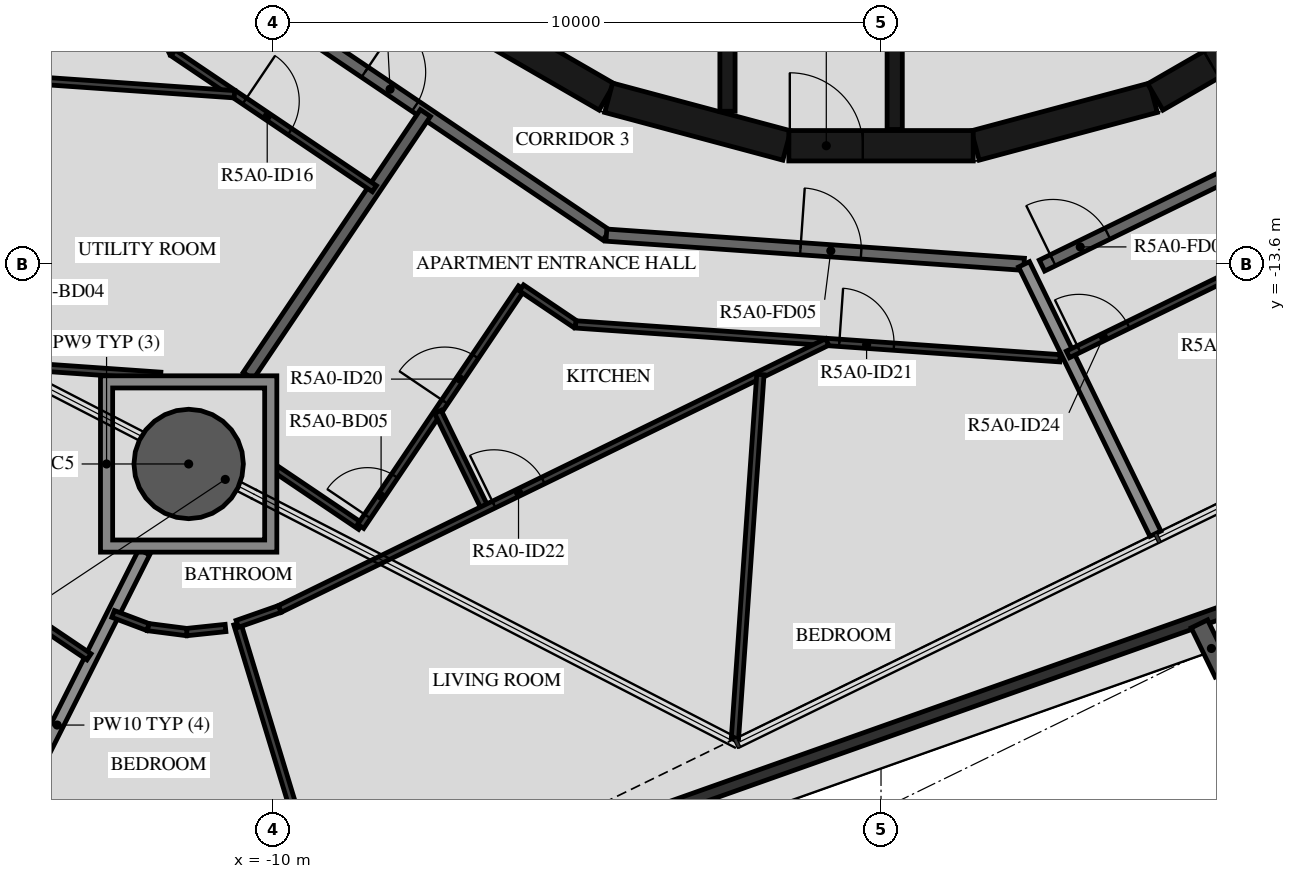
"""IFC4 building model, lengths in metres.
Left out: names, types, materials, properties, quantities, classifications, styles, units other than length and angle.
Written with IfcOpenShell. Run it as: python <this file> out.ifc"""

import sys

from ifc_helpers import new_model, si_unit, direction, frame, frame_2d, origin, origin_2d, place, context, subcontext, project, spatial, polyline, rectangle, hollow_circle, i_section, outline, extrude, element, fill, save


model = new_model("IFC4")
c1 = context("Model", 3, precision=1e-05, world=origin(), true_north=direction((0.0, 1.0)))
c2 = subcontext(c1, "Body", "Model", "MODEL_VIEW")
j1 = project(units=[si_unit("LENGTHUNIT", "METRE"), si_unit("PLANEANGLEUNIT", "RADIAN")], contexts=[c1])
p1 = place(None, origin())
s1 = spatial("IfcSite", under=j1, at=p1, CompositionType="ELEMENT")
p2 = place(p1, origin())
s2 = spatial("IfcBuilding", under=s1, at=p2, CompositionType="ELEMENT")
p3 = place(p2, frame((0.0, 0.0, 188.4)))
s3 = spatial("IfcBuildingStorey", under=s2, at=p3, CompositionType="ELEMENT", Elevation=188.4)
p4 = place(p3, frame((-11.386, -16.881, -0.45), z_axis=(0.0, 0.0, 1.0), x_axis=(1.0, 0.0, 0.0)))
e1 = element("IfcColumn", 1, at=p4, inside=s3, PredefinedType="COLUMN", context=c2, shape_type="SweptSolid", body=[
    extrude(hollow_circle(Radius=0.9, WallThickness=0.04, at=origin_2d()), origin(), (0.0, 0.0, 1.0), 3.57),
])
p5 = place(p3, frame((5.433, -19.915, -0.45), z_axis=(0.0, 0.0, 1.0), x_axis=(-0.898794095235, -0.438371046456, 0.0)))
e2 = element("IfcColumn", 2, at=p5, inside=s3, PredefinedType="COLUMN", context=c2, shape_type="SweptSolid", body=[
    extrude(i_section(OverallWidth=0.3, OverallDepth=0.9, WebThickness=0.019, FlangeThickness=0.035, FilletRadius=0.03, at=origin_2d()), origin(), (0.0, 0.0, 1.0), 3.57),
])
p6 = place(p3, frame((6.704, -18.931, 0.03), z_axis=(0.0, 0.0, 1.0), x_axis=(-0.942641899569, -0.33380570573, 0.0)))
e3 = element("IfcWall", 3, at=p6, inside=s3, PredefinedType="PARAPET", context=c2, shape_type="SweptSolid", body=[
    extrude(rectangle(XDim=18.214, YDim=0.2, at=frame_2d((9.107, 0.0))), origin(), (0.0, 0.0, 1.0), 1.5),
])
p7 = place(p3, frame((1.55, -11.643, 0.0), z_axis=(0.0, 0.0, 1.0), x_axis=(0.965948410781, 0.258734743916, 0.0)))
e4 = element("IfcWall", 4, at=p7, inside=s3, PredefinedType="SHEAR", context=c2, shape_type="SweptSolid", body=[
    extrude(rectangle(XDim=3.033, YDim=0.5, at=frame_2d((1.516, 0.0))), origin(), (0.0, 0.0, 1.0), 3.12),
])
p8 = place(p3, frame((4.51, -10.845, 0.0), z_axis=(0.0, 0.0, 1.0), x_axis=(0.865975092491, 0.500087131594, 0.0)))
e5 = element("IfcWall", 5, at=p8, inside=s3, PredefinedType="SHEAR", context=c2, shape_type="SweptSolid", body=[
    extrude(rectangle(XDim=3.033, YDim=0.5, at=frame_2d((1.516, 0.0))), origin(), (0.0, 0.0, 1.0), 3.12),
])
p9 = place(p8, frame((1.066, 0.0, 0.0)))
e6 = element("IfcOpeningElement", 6, at=p9, cuts=e5, PredefinedType="OPENING", context=c2, shape_type="SweptSolid", body=[
    extrude(rectangle(XDim=0.9, YDim=2.1, at=frame_2d((0.45, 1.05))), frame((0.0, 0.26, 0.0), z_axis=(0.0, -1.0, 0.0), x_axis=(1.0, 0.0, 0.0)), (0.0, 0.0, 1.0), 0.52),
])
for number, where, z_axis, x_axis in (
    (7, (-7.137, -9.329, 0.0), (0.0, 0.0, 1.0), (0.866, -0.5, 0.0)),
    (8, (-4.479, -10.858, 0.0), (0.0, 0.0, 1.0), (0.966, -0.259, 0.0)),
):
    element("IfcWall", number, at=place(p3, frame(where, z_axis=z_axis, x_axis=x_axis)), inside=s3, PredefinedType="SHEAR", context=c2, shape_type="SweptSolid", body=[
        extrude(rectangle(XDim=3.033, YDim=0.5, at=frame_2d((1.516, 0.0))), origin(), (0.0, 0.0, 1.0), 3.12),
    ])
p10 = place(p3, frame((-1.516, -11.647, 0.0), z_axis=(0.0, 0.0, 1.0), x_axis=(1.0, 0.0, 0.0)))
e9 = element("IfcWall", 9, at=p10, inside=s3, PredefinedType="SHEAR", context=c2, shape_type="SweptSolid", body=[
    extrude(rectangle(XDim=3.033, YDim=0.5, at=frame_2d((1.516, 0.0))), origin(), (0.0, 0.0, 1.0), 3.12),
])
p11 = place(p10, frame((0.016, 0.0, 0.0)))
e10 = element("IfcOpeningElement", 10, at=p11, cuts=e9, PredefinedType="OPENING", context=c2, shape_type="SweptSolid", body=[
    extrude(rectangle(XDim=1.2, YDim=2.1, at=frame_2d((0.6, 1.05))), frame((0.0, 0.26, 0.0), z_axis=(0.0, -1.0, 0.0), x_axis=(1.0, 0.0, 0.0)), (0.0, 0.0, 1.0), 0.52),
])
p12 = place(p3, frame((-2.525, -8.97, 0.0), z_axis=(0.0, 0.0, 1.0), x_axis=(0.0, -1.0, 0.0)))
e11 = element("IfcWall", 11, at=p12, inside=s3, PredefinedType="SHEAR", context=c2, shape_type="SweptSolid", body=[
    extrude(rectangle(XDim=2.11, YDim=0.25, at=frame_2d((1.055, 0.0))), origin(), (0.0, 0.0, 1.0), 3.12),
])
p13 = place(p3, frame((0.225, -8.97, 0.0), z_axis=(0.0, 0.0, 1.0), x_axis=(0.0, -1.0, 0.0)))
e12 = element("IfcWall", 12, at=p13, inside=s3, PredefinedType="SHEAR", context=c2, shape_type="SweptSolid", body=[
    extrude(rectangle(XDim=2.41, YDim=0.25, at=frame_2d((1.205, 0.0))), origin(), (0.0, 0.0, 1.0), 3.12),
])
p14 = place(p3, frame((-10.47, -9.101, 0.0), z_axis=(0.0, 0.0, 1.0), x_axis=(0.829035841718, -0.559195469534, 0.0)))
e13 = element("IfcWall", 13, at=p14, inside=s3, PredefinedType="STANDARD", context=c2, shape_type="SweptSolid", body=[
    extrude(rectangle(XDim=7.181, YDim=0.2, at=frame_2d((3.591, 0.0))), origin(), (0.0, 0.0, 1.0), 3.12),
])
p15 = place(p14, frame((2.39, 0.0, 0.0)))
e14 = element("IfcOpeningElement", 14, at=p15, cuts=e13, PredefinedType="OPENING", context=c2, shape_type="SweptSolid", body=[
    extrude(rectangle(XDim=1.0, YDim=2.1, at=frame_2d((0.5, 1.05))), frame((0.0, 0.11, 0.0), z_axis=(0.0, -1.0, 0.0), x_axis=(1.0, 0.0, 0.0)), (0.0, 0.0, 1.0), 0.22),
])
p16 = place(p3, frame((-4.517, -13.117, 0.0), z_axis=(0.0, 0.0, 1.0), x_axis=(0.997564669554, -0.069747616856, 0.0)))
e15 = element("IfcWall", 15, at=p16, inside=s3, PredefinedType="STANDARD", context=c2, shape_type="SweptSolid", body=[
    extrude(rectangle(XDim=6.885, YDim=0.2, at=frame_2d((3.443, 0.0))), origin(), (0.0, 0.0, 1.0), 3.12),
])
p17 = place(p16, frame((3.2, 0.0, 0.0)))
e16 = element("IfcOpeningElement", 16, at=p17, cuts=e15, PredefinedType="OPENING", context=c2, shape_type="SweptSolid", body=[
    extrude(rectangle(XDim=1.0, YDim=2.1, at=frame_2d((0.5, 1.05))), frame((0.0, 0.11, 0.0), z_axis=(0.0, -1.0, 0.0), x_axis=(1.0, 0.0, 0.0)), (0.0, 0.0, 1.0), 0.22),
])
p18 = place(p3, frame((2.647, -13.618, 0.0), z_axis=(0.0, 0.0, 1.0), x_axis=(0.898796543751, 0.438366026218, 0.0)))
e17 = element("IfcWall", 17, at=p18, inside=s3, PredefinedType="STANDARD", context=c2, shape_type="SweptSolid", body=[
    extrude(rectangle(XDim=7.181, YDim=0.2, at=frame_2d((3.591, 0.0))), origin(), (0.0, 0.0, 1.0), 3.12),
])
p19 = place(p18, frame((0.2, 0.0, 0.0)))
e18 = element("IfcOpeningElement", 18, at=p19, cuts=e17, PredefinedType="OPENING", context=c2, shape_type="SweptSolid", body=[
    extrude(rectangle(XDim=1.0, YDim=2.1, at=frame_2d((0.5, 1.05))), frame((0.0, 0.11, 0.0), z_axis=(0.0, -1.0, 0.0), x_axis=(1.0, 0.0, 0.0)), (0.0, 0.0, 1.0), 0.22),
])
p20 = place(p3, frame((-10.407, -15.43, 0.0), z_axis=(0.0, 0.0, 1.0), x_axis=(0.559038328133, 0.829141813973, 0.0)))
e19 = element("IfcWall", 19, at=p20, inside=s3, PredefinedType="STANDARD", context=c2, shape_type="SweptSolid", body=[
    extrude(rectangle(XDim=5.212, YDim=0.2, at=frame_2d((2.606, 0.0))), origin(), (0.0, 0.0, 1.0), 3.12),
])
p21 = place(p3, frame((-14.979, -24.017, 0.0), z_axis=(0.0, 0.0, 1.0), x_axis=(0.449711952388, 0.893173644864, 0.0)))
e20 = element("IfcWall", 20, at=p21, inside=s3, PredefinedType="STANDARD", context=c2, shape_type="SweptSolid", body=[
    extrude(rectangle(XDim=6.367, YDim=0.2, at=frame_2d((3.184, 0.0))), origin(), (0.0, 0.0, 1.0), 2.73),
])
p22 = place(p3, frame((4.512, -18.027, 0.0), z_axis=(0.0, 0.0, 1.0), x_axis=(-0.438374835386, 0.898792247241, 0.0)))
e21 = element("IfcWall", 21, at=p22, inside=s3, PredefinedType="STANDARD", context=c2, shape_type="SweptSolid", body=[
    extrude(rectangle(XDim=4.929, YDim=0.2, at=frame_2d((2.464, 0.0))), origin(), (0.0, 0.0, 1.0), 2.73),
])
p23 = place(p3, frame((-13.715, -5.87, 0.0), z_axis=(0.0, 0.0, 1.0), x_axis=(0.438372766482, -0.89879325632, 0.0)))
e22 = element("IfcWall", 22, at=p23, inside=s3, PredefinedType="PARTITIONING", context=c2, shape_type="SweptSolid", body=[
    extrude(rectangle(XDim=4.728, YDim=0.12, at=frame_2d((2.364, 0.0))), origin(), (0.0, 0.0, 1.0), 3.12),
])
p24 = place(p23, frame((0.4, 0.0, 0.0)))
e23 = element("IfcOpeningElement", 23, at=p24, cuts=e22, PredefinedType="OPENING", context=c2, shape_type="SweptSolid", body=[
    extrude(rectangle(XDim=0.9, YDim=2.1, at=frame_2d((0.45, 1.05))), frame((0.0, 0.07, 0.0), z_axis=(0.0, -1.0, 0.0), x_axis=(1.0, 0.0, 0.0)), (0.0, 0.0, 1.0), 0.14),
])
p25 = place(p3, frame((-11.642, -10.12, 0.0), z_axis=(0.0, 0.0, 1.0), x_axis=(0.829018066952, -0.559221820629, 0.0)))
e24 = element("IfcWall", 24, at=p25, inside=s3, PredefinedType="PARTITIONING", context=c2, shape_type="SweptSolid", body=[
    extrude(rectangle(XDim=3.992, YDim=0.12, at=frame_2d((1.996, 0.0))), origin(), (0.0, 0.0, 1.0), 3.12),
])
p26 = place(p25, frame((1.417, 0.0, 0.0)))
e25 = element("IfcOpeningElement", 25, at=p26, cuts=e24, PredefinedType="OPENING", context=c2, shape_type="SweptSolid", body=[
    extrude(rectangle(XDim=0.9, YDim=2.1, at=frame_2d((0.45, 1.05))), frame((0.0, 0.07, 0.0), z_axis=(0.0, -1.0, 0.0), x_axis=(1.0, 0.0, 0.0)), (0.0, 0.0, 1.0), 0.14),
])
p27 = place(p3, frame((-14.551, -10.527, 0.0), z_axis=(0.0, 0.0, 1.0), x_axis=(0.997564247633, -0.069753651118, 0.0)))
e26 = element("IfcWall", 26, at=p27, inside=s3, PredefinedType="PARTITIONING", context=c2, shape_type="SweptSolid", body=[
    extrude(rectangle(XDim=3.927, YDim=0.12, at=frame_2d((1.963, 0.0))), origin(), (0.0, 0.0, 1.0), 3.12),
])
p28 = place(p3, frame((-14.879, -15.219, 0.0), z_axis=(0.0, 0.0, 1.0), x_axis=(0.997566012813, -0.069728402248, 0.0)))
e27 = element("IfcWall", 27, at=p28, inside=s3, PredefinedType="PARTITIONING", context=c2, shape_type="SweptSolid", body=[
    extrude(rectangle(XDim=3.039, YDim=0.12, at=frame_2d((1.52, 0.0))), origin(), (0.0, 0.0, 1.0), 3.12),
])
p29 = place(p28, frame((0.2, 0.0, 0.0)))
e28 = element("IfcOpeningElement", 28, at=p29, cuts=e27, PredefinedType="OPENING", context=c2, shape_type="SweptSolid", body=[
    extrude(rectangle(XDim=0.8, YDim=2.1, at=frame_2d((0.4, 1.05))), frame((0.0, 0.07, 0.0), z_axis=(0.0, -1.0, 0.0), x_axis=(1.0, 0.0, 0.0)), (0.0, 0.0, 1.0), 0.14),
])
p30 = place(p3, frame((-13.025, -20.052, 0.0), z_axis=(0.0, 0.0, 1.0), x_axis=(-0.828910137223, 0.559381787699, 0.0)))
e29 = element("IfcWall", 29, at=p30, inside=s3, PredefinedType="PARTITIONING", context=c2, shape_type="SweptSolid", body=[
    extrude(rectangle(XDim=0.829, YDim=0.12, at=frame_2d((0.415, 0.0))), origin(), (0.0, 0.0, 1.0), 3.12),
])
p31 = place(p3, frame((-9.936, -16.976, 0.0), z_axis=(0.0, 0.0, 1.0), x_axis=(0.829057888835, -0.559162782167, 0.0)))
e30 = element("IfcWall", 30, at=p31, inside=s3, PredefinedType="PARTITIONING", context=c2, shape_type="SweptSolid", body=[
    extrude(rectangle(XDim=1.664, YDim=0.12, at=frame_2d((0.832, 0.0))), origin(), (0.0, 0.0, 1.0), 3.12),
])
p32 = place(p3, frame((-8.557, -17.906, 0.0), z_axis=(0.0, 0.0, 1.0), x_axis=(0.559194471553, 0.829036514868, 0.0)))
e31 = element("IfcWall", 31, at=p32, inside=s3, PredefinedType="PARTITIONING", context=c2, shape_type="SweptSolid", body=[
    extrude(rectangle(XDim=4.73, YDim=0.12, at=frame_2d((2.365, 0.0))), origin(), (0.0, 0.0, 1.0), 3.12),
])
p33 = place(p32, frame((0.2, 0.0, 0.0)))
e32 = element("IfcOpeningElement", 32, at=p33, cuts=e31, PredefinedType="OPENING", context=c2, shape_type="SweptSolid", body=[
    extrude(rectangle(XDim=0.8, YDim=2.1, at=frame_2d((0.4, 1.05))), frame((0.0, 0.07, 0.0), z_axis=(0.0, -1.0, 0.0), x_axis=(1.0, 0.0, 0.0)), (0.0, 0.0, 1.0), 0.14),
])
p34 = place(p32, frame((2.471, 0.0, 0.0)))
e33 = element("IfcOpeningElement", 33, at=p34, cuts=e31, PredefinedType="OPENING", context=c2, shape_type="SweptSolid", body=[
    extrude(rectangle(XDim=0.9, YDim=2.1, at=frame_2d((0.45, 1.05))), frame((0.0, 0.07, 0.0), z_axis=(0.0, -1.0, 0.0), x_axis=(1.0, 0.0, 0.0)), (0.0, 0.0, 1.0), 0.14),
])
p35 = place(p3, frame((-5.912, -13.985, 0.0), z_axis=(0.0, 0.0, 1.0), x_axis=(0.829027978444, -0.559207127062, 0.0)))
e34 = element("IfcWall", 34, at=p35, inside=s3, PredefinedType="PARTITIONING", context=c2, shape_type="SweptSolid", body=[
    extrude(rectangle(XDim=1.073, YDim=0.12, at=frame_2d((0.537, 0.0))), origin(), (0.0, 0.0, 1.0), 3.12),
])
p36 = place(p3, frame((-5.022, -14.585, 0.0), z_axis=(0.0, 0.0, 1.0), x_axis=(0.997565118395, -0.069741197017, 0.0)))
e35 = element("IfcWall", 35, at=p36, inside=s3, PredefinedType="PARTITIONING", context=c2, shape_type="SweptSolid", body=[
    extrude(rectangle(XDim=7.985, YDim=0.12, at=frame_2d((3.993, 0.0))), origin(), (0.0, 0.0, 1.0), 3.12),
])
p37 = place(p36, frame((4.346, 0.0, 0.0)))
e36 = element("IfcOpeningElement", 36, at=p37, cuts=e35, PredefinedType="OPENING", context=c2, shape_type="SweptSolid", body=[
    extrude(rectangle(XDim=0.9, YDim=2.1, at=frame_2d((0.45, 1.05))), frame((0.0, 0.07, 0.0), z_axis=(0.0, -1.0, 0.0), x_axis=(1.0, 0.0, 0.0)), (0.0, 0.0, 1.0), 0.14),
])
p38 = place(p3, frame((-10.78, -19.578, 0.0), z_axis=(0.0, 0.0, 1.0), x_axis=(-0.994515867502, -0.104585798686, 0.0)))
e37 = element("IfcWall", 37, at=p38, inside=s3, PredefinedType="PARTITIONING", context=c2, shape_type="SweptSolid", body=[
    extrude(rectangle(XDim=0.642, YDim=0.12, at=frame_2d((0.321, 0.0))), origin(), (0.0, 0.0, 1.0), 3.12),
])
p39 = place(p3, frame((-11.418, -19.645, 0.0), z_axis=(0.0, 0.0, 1.0), x_axis=(-0.991802759529, 0.127778269633, 0.0)))
e38 = element("IfcWall", 38, at=p39, inside=s3, PredefinedType="PARTITIONING", context=c2, shape_type="SweptSolid", body=[
    extrude(rectangle(XDim=0.642, YDim=0.12, at=frame_2d((0.321, 0.0))), origin(), (0.0, 0.0, 1.0), 3.12),
])
p40 = place(p3, frame((-12.055, -19.563, 0.0), z_axis=(0.0, 0.0, 1.0), x_axis=(-0.935507243946, 0.353307509862, 0.0)))
e39 = element("IfcWall", 39, at=p40, inside=s3, PredefinedType="PARTITIONING", context=c2, shape_type="SweptSolid", body=[
    extrude(rectangle(XDim=0.612, YDim=0.12, at=frame_2d((0.306, 0.0))), origin(), (0.0, 0.0, 1.0), 3.12),
])
p41 = place(p3, frame((-9.072, -24.489, 0.0), z_axis=(0.0, 0.0, 1.0), x_axis=(-0.291025348593, 0.956715342449, 0.0)))
e40 = element("IfcWall", 40, at=p41, inside=s3, PredefinedType="PARTITIONING", context=c2, shape_type="SweptSolid", body=[
    extrude(rectangle(XDim=5.205, YDim=0.12, at=frame_2d((2.602, 0.0))), origin(), (0.0, 0.0, 1.0), 3.12),
])
p42 = place(p41, frame((0.2, 0.0, 0.0)))
e41 = element("IfcOpeningElement", 41, at=p42, cuts=e40, PredefinedType="OPENING", context=c2, shape_type="SweptSolid", body=[
    extrude(rectangle(XDim=0.9, YDim=2.1, at=frame_2d((0.45, 1.05))), frame((0.0, 0.07, 0.0), z_axis=(0.0, -1.0, 0.0), x_axis=(1.0, 0.0, 0.0)), (0.0, 0.0, 1.0), 0.14),
])
p43 = place(p3, frame((-6.51, -17.617, 0.0), z_axis=(0.0, 0.0, 1.0), x_axis=(-0.438380229518, 0.898789616299, 0.0)))
e42 = element("IfcWall", 42, at=p43, inside=s3, PredefinedType="PARTITIONING", context=c2, shape_type="SweptSolid", body=[
    extrude(rectangle(XDim=1.773, YDim=0.12, at=frame_2d((0.887, 0.0))), origin(), (0.0, 0.0, 1.0), 3.12),
])
p44 = place(p3, frame((-10.586, -19.51, 0.0), z_axis=(0.0, 0.0, 1.0), x_axis=(0.943560277016, 0.3312008509, 0.0)))
e43 = element("IfcWall", 43, at=p44, inside=s3, PredefinedType="PARTITIONING", context=c2, shape_type="SweptSolid", body=[
    extrude(rectangle(XDim=0.741, YDim=0.12, at=frame_2d((0.371, 0.0))), origin(), (0.0, 0.0, 1.0), 3.12),
])
p45 = place(p3, frame((-9.886, -19.264, 0.0), z_axis=(0.0, 0.0, 1.0), x_axis=(0.898796326112, 0.43836647245, 0.0)))
e44 = element("IfcWall", 44, at=p45, inside=s3, PredefinedType="PARTITIONING", context=c2, shape_type="SweptSolid", body=[
    extrude(rectangle(XDim=10.014, YDim=0.12, at=frame_2d((5.007, 0.0))), origin(), (0.0, 0.0, 1.0), 3.12),
])
p46 = place(p45, frame((3.917, 0.0, 0.0)))
e45 = element("IfcOpeningElement", 45, at=p46, cuts=e44, PredefinedType="OPENING", context=c2, shape_type="SweptSolid", body=[
    extrude(rectangle(XDim=0.9, YDim=2.1, at=frame_2d((0.45, 1.05))), frame((0.0, 0.07, 0.0), z_axis=(0.0, -1.0, 0.0), x_axis=(1.0, 0.0, 0.0)), (0.0, 0.0, 1.0), 0.14),
])
p47 = place(p3, frame((-2.403, -21.4, 0.0), z_axis=(0.0, 0.0, 1.0), x_axis=(0.069729998801, 0.997565901215, 0.0)))
e46 = element("IfcWall", 46, at=p47, inside=s3, PredefinedType="PARTITIONING", context=c2, shape_type="SweptSolid", body=[
    extrude(rectangle(XDim=6.005, YDim=0.12, at=frame_2d((3.002, 0.0))), origin(), (0.0, 0.0, 1.0), 3.12),
])
p48 = place(p3, frame((3.074, -15.078, 0.0), z_axis=(0.0, 0.0, 1.0), x_axis=(0.898800770739, 0.438357359377, 0.0)))
e47 = element("IfcWall", 47, at=p48, inside=s3, PredefinedType="PARTITIONING", context=c2, shape_type="SweptSolid", body=[
    extrude(rectangle(XDim=7.694, YDim=0.12, at=frame_2d((3.847, 0.0))), origin(), (0.0, 0.0, 1.0), 3.12),
])
p49 = place(p48, frame((0.2, 0.0, 0.0)))
e48 = element("IfcOpeningElement", 48, at=p49, cuts=e47, PredefinedType="OPENING", context=c2, shape_type="SweptSolid", body=[
    extrude(rectangle(XDim=0.9, YDim=2.1, at=frame_2d((0.45, 1.05))), frame((0.0, 0.07, 0.0), z_axis=(0.0, -1.0, 0.0), x_axis=(1.0, 0.0, 0.0)), (0.0, 0.0, 1.0), 0.14),
])
p50 = place(p3, origin())
e49 = element("IfcWall", 49, at=p50, inside=s3, PredefinedType="STANDARD", context=c2, shape_type="SweptSolid", body=[
    extrude(outline(polyline([(-9.936, -15.43), (-9.936, -18.331), (-12.836, -18.331), (-12.836, -15.43), (-9.936, -15.43)]), holes=[polyline([(-12.636, -18.131), (-10.136, -18.131), (-10.136, -15.631), (-12.636, -15.631), (-12.636, -18.131)])]), origin(), (0.0, 0.0, 1.0), 3.12),
])
p51 = place(p11, origin())
e50 = element("IfcDoor", 50, at=p51, inside=s3, OperationType="SINGLE_SWING_RIGHT", PredefinedType="DOOR", context=c2, shape_type="SweptSolid", body=[
    extrude(rectangle(XDim=1.2, YDim=2.1, at=frame_2d((0.6, 1.05))), frame((0.0, 0.025, 0.0), z_axis=(0.0, -1.0, 0.0), x_axis=(1.0, 0.0, 0.0)), (0.0, 0.0, 1.0), 0.05),
])
fill(e10, e50)
p52 = place(p9, origin())
e51 = element("IfcDoor", 51, at=p52, inside=s3, OperationType="SINGLE_SWING_RIGHT", PredefinedType="DOOR", context=c2, shape_type="SweptSolid", body=[
    extrude(rectangle(XDim=0.9, YDim=2.1, at=frame_2d((0.45, 1.05))), frame((0.0, 0.025, 0.0), z_axis=(0.0, -1.0, 0.0), x_axis=(1.0, 0.0, 0.0)), (0.0, 0.0, 1.0), 0.05),
])
fill(e6, e51)
p53 = place(p15, origin())
e52 = element("IfcDoor", 52, at=p53, inside=s3, OperationType="SINGLE_SWING_RIGHT", PredefinedType="DOOR", context=c2, shape_type="SweptSolid", body=[
    extrude(rectangle(XDim=1.0, YDim=2.1, at=frame_2d((0.5, 1.05))), frame((0.0, 0.025, 0.0), z_axis=(0.0, -1.0, 0.0), x_axis=(1.0, 0.0, 0.0)), (0.0, 0.0, 1.0), 0.05),
])
fill(e14, e52)
p54 = place(p26, origin())
e53 = element("IfcDoor", 53, at=p54, inside=s3, OperationType="SINGLE_SWING_RIGHT", PredefinedType="DOOR", context=c2, shape_type="SweptSolid", body=[
    extrude(rectangle(XDim=0.9, YDim=2.1, at=frame_2d((0.45, 1.05))), frame((0.0, 0.025, 0.0), z_axis=(0.0, -1.0, 0.0), x_axis=(1.0, 0.0, 0.0)), (0.0, 0.0, 1.0), 0.05),
])
fill(e25, e53)
p55 = place(p17, origin())
e54 = element("IfcDoor", 54, at=p55, inside=s3, OperationType="SINGLE_SWING_LEFT", PredefinedType="DOOR", context=c2, shape_type="SweptSolid", body=[
    extrude(rectangle(XDim=1.0, YDim=2.1, at=frame_2d((0.5, 1.05))), frame((0.0, 0.025, 0.0), z_axis=(0.0, -1.0, 0.0), x_axis=(1.0, 0.0, 0.0)), (0.0, 0.0, 1.0), 0.05),
])
fill(e16, e54)
p56 = place(p33, origin())
e55 = element("IfcDoor", 55, at=p56, inside=s3, OperationType="SINGLE_SWING_LEFT", PredefinedType="DOOR", context=c2, shape_type="SweptSolid", body=[
    extrude(rectangle(XDim=0.8, YDim=2.1, at=frame_2d((0.4, 1.05))), frame((0.0, 0.025, 0.0), z_axis=(0.0, -1.0, 0.0), x_axis=(1.0, 0.0, 0.0)), (0.0, 0.0, 1.0), 0.05),
])
fill(e32, e55)
p57 = place(p34, origin())
e56 = element("IfcDoor", 56, at=p57, inside=s3, OperationType="SINGLE_SWING_LEFT", PredefinedType="DOOR", context=c2, shape_type="SweptSolid", body=[
    extrude(rectangle(XDim=0.9, YDim=2.1, at=frame_2d((0.45, 1.05))), frame((0.0, 0.025, 0.0), z_axis=(0.0, -1.0, 0.0), x_axis=(1.0, 0.0, 0.0)), (0.0, 0.0, 1.0), 0.05),
])
fill(e33, e56)
p58 = place(p37, origin())
e57 = element("IfcDoor", 57, at=p58, inside=s3, OperationType="SINGLE_SWING_LEFT", PredefinedType="DOOR", context=c2, shape_type="SweptSolid", body=[
    extrude(rectangle(XDim=0.9, YDim=2.1, at=frame_2d((0.45, 1.05))), frame((0.0, 0.025, 0.0), z_axis=(0.0, -1.0, 0.0), x_axis=(1.0, 0.0, 0.0)), (0.0, 0.0, 1.0), 0.05),
])
fill(e36, e57)
p59 = place(p46, origin())
e58 = element("IfcDoor", 58, at=p59, inside=s3, OperationType="SINGLE_SWING_LEFT", PredefinedType="DOOR", context=c2, shape_type="SweptSolid", body=[
    extrude(rectangle(XDim=0.9, YDim=2.1, at=frame_2d((0.45, 1.05))), frame((0.0, 0.025, 0.0), z_axis=(0.0, -1.0, 0.0), x_axis=(1.0, 0.0, 0.0)), (0.0, 0.0, 1.0), 0.05),
])
fill(e45, e58)
p60 = place(p19, origin())
e59 = element("IfcDoor", 59, at=p60, inside=s3, OperationType="SINGLE_SWING_LEFT", PredefinedType="DOOR", context=c2, shape_type="SweptSolid", body=[
    extrude(rectangle(XDim=1.0, YDim=2.1, at=frame_2d((0.5, 1.05))), frame((0.0, 0.025, 0.0), z_axis=(0.0, -1.0, 0.0), x_axis=(1.0, 0.0, 0.0)), (0.0, 0.0, 1.0), 0.05),
])
fill(e18, e59)
p61 = place(p49, origin())
e60 = element("IfcDoor", 60, at=p61, inside=s3, OperationType="SINGLE_SWING_LEFT", PredefinedType="DOOR", context=c2, shape_type="SweptSolid", body=[
    extrude(rectangle(XDim=0.9, YDim=2.1, at=frame_2d((0.45, 1.05))), frame((0.0, 0.025, 0.0), z_axis=(0.0, -1.0, 0.0), x_axis=(1.0, 0.0, 0.0)), (0.0, 0.0, 1.0), 0.05),
])
fill(e48, e60)
save(model, sys.argv[1])
